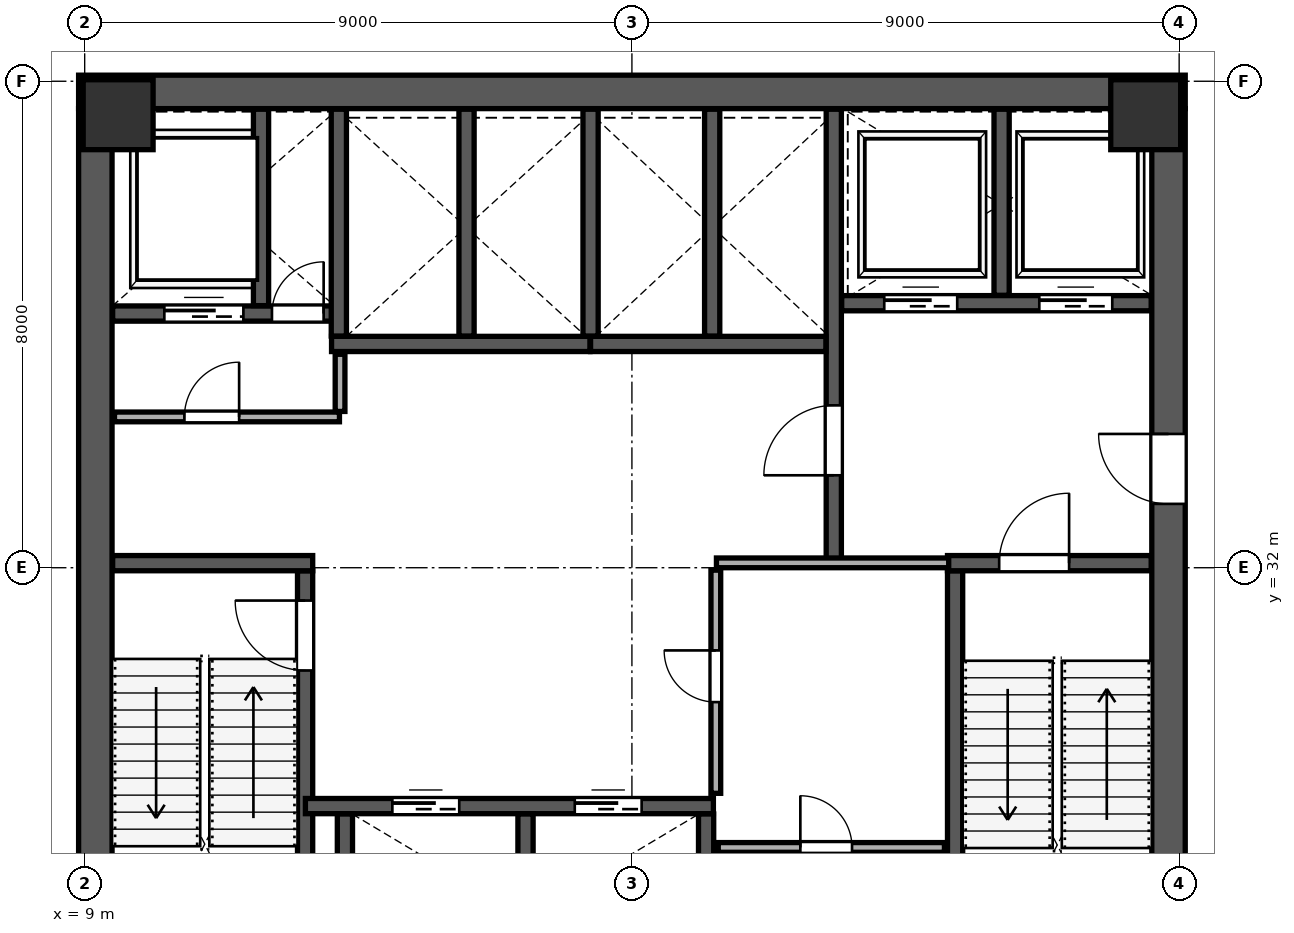
"""IFC4 building model, lengths in metres.
Left out: names, types, materials, properties, quantities, classifications, styles, units other than length and angle.
Written with IfcOpenShell. Run it as: python <this file> out.ifc"""

import sys

from ifc_helpers import new_model, si_unit, direction, frame, frame_2d, origin, origin_2d, place, context, subcontext, project, spatial, rectangle, extrude, source, transform, mapped, element, fill, save


model = new_model("IFC4")
c1 = context("Model", 3, precision=1e-05, world=origin(), true_north=direction((0.0, 1.0)))
c2 = subcontext(c1, "Body", "Model", "MODEL_VIEW")
j1 = project(units=[si_unit("LENGTHUNIT", "METRE"), si_unit("PLANEANGLEUNIT", "RADIAN")], contexts=[c1])
p1 = place(None, origin())
s1 = spatial("IfcSite", under=j1, at=p1, CompositionType="ELEMENT")
p2 = place(p1, origin())
s2 = spatial("IfcBuilding", under=s1, at=p2, CompositionType="ELEMENT")
p3 = place(p2, frame((0.0, 0.0, 95.8)))
s3 = spatial("IfcBuildingStorey", under=s2, at=p3, CompositionType="ELEMENT", Elevation=95.8)
m1 = source(origin(), c2, "Body", "SweptSolid", [
    extrude(rectangle(XDim=1.15, YDim=1.15, at=origin_2d()), origin(), (0.0, 0.0, 1.0), 4.198),
])
for number, where, z_axis, x_axis in (
    (1, (9.55, 39.45, 0.001), (0.0, 0.0, 1.0), (1.0, 0.0, 0.0)),
    (2, (26.45, 39.45, 0.001), (0.0, 0.0, 1.0), (1.0, 0.0, 0.0)),
):
    element("IfcColumn", number, at=place(p3, frame(where, z_axis=z_axis, x_axis=x_axis)), inside=s3, PredefinedType="COLUMN", context=c2, shape_type="MappedRepresentation", body=[
        mapped(m1, transform((0.0, 0.0, 0.0), scale=1.0)),
    ])
p4 = place(p3, frame((9.175, 24.45, 0.0), z_axis=(0.0, 0.0, 1.0), x_axis=(0.0, 1.0, 0.0)))
e3 = element("IfcWall", 3, at=p4, inside=s3, PredefinedType="SHEAR", context=c2, shape_type="SweptSolid", body=[
    extrude(rectangle(XDim=15.1, YDim=0.55, at=frame_2d((7.55, 0.0))), origin(), (0.0, 0.0, 1.0), 3.96),
])
p5 = place(p3, frame((26.825, 24.45, 0.0), z_axis=(0.0, 0.0, 1.0), x_axis=(0.0, 1.0, 0.0)))
e4 = element("IfcWall", 4, at=p5, inside=s3, PredefinedType="SHEAR", context=c2, shape_type="SweptSolid", body=[
    extrude(rectangle(XDim=15.1, YDim=0.55, at=frame_2d((7.55, 0.0))), origin(), (0.0, 0.0, 1.0), 3.96),
])
p6 = place(p5, frame((8.6, 0.0, 0.0)))
e5 = element("IfcOpeningElement", 5, at=p6, cuts=e4, PredefinedType="OPENING", context=c2, shape_type="SweptSolid", body=[
    extrude(rectangle(XDim=1.15, YDim=2.2, at=frame_2d((0.575, 1.1))), frame((0.0, 0.285, 0.0), z_axis=(0.0, -1.0, 0.0), x_axis=(1.0, 0.0, 0.0)), (0.0, 0.0, 1.0), 0.57),
])
p7 = place(p3, frame((8.9, 39.825, 0.0), z_axis=(0.0, 0.0, 1.0), x_axis=(1.0, 0.0, 0.0)))
e6 = element("IfcWall", 6, at=p7, inside=s3, PredefinedType="SHEAR", context=c2, shape_type="SweptSolid", body=[
    extrude(rectangle(XDim=18.2, YDim=0.55, at=frame_2d((9.1, 0.0))), origin(), (0.0, 0.0, 1.0), 3.96),
])
p8 = place(p3, frame((12.625, 24.46, 0.0), z_axis=(0.0, 0.0, 1.0), x_axis=(0.0, 1.0, 0.0)))
e7 = element("IfcWall", 7, at=p8, inside=s3, PredefinedType="SHEAR", context=c2, shape_type="SweptSolid", body=[
    extrude(rectangle(XDim=7.49, YDim=0.25, at=frame_2d((3.745, 0.0))), origin(), (0.0, 0.0, 1.0), 3.96),
])
p9 = place(p8, frame((5.85, 0.0, 0.0)))
e8 = element("IfcOpeningElement", 8, at=p9, cuts=e7, PredefinedType="OPENING", context=c2, shape_type="SweptSolid", body=[
    extrude(rectangle(XDim=1.15, YDim=2.2, at=frame_2d((0.575, 1.1))), frame((0.0, 0.135, 0.0), z_axis=(0.0, -1.0, 0.0), x_axis=(1.0, 0.0, 0.0)), (0.0, 0.0, 1.0), 0.27),
])
p10 = place(p3, frame((9.46, 32.075, 0.0), z_axis=(0.0, 0.0, 1.0), x_axis=(1.0, 0.0, 0.0)))
e9 = element("IfcWall", 9, at=p10, inside=s3, PredefinedType="SHEAR", context=c2, shape_type="SweptSolid", body=[
    extrude(rectangle(XDim=3.29, YDim=0.25, at=frame_2d((1.645, 0.0))), origin(), (0.0, 0.0, 1.0), 3.96),
])
p11 = place(p3, frame((23.315, 24.46, 0.0), z_axis=(0.0, 0.0, 1.0), x_axis=(0.0, 1.0, 0.0)))
e10 = element("IfcWall", 10, at=p11, inside=s3, PredefinedType="SHEAR", context=c2, shape_type="SweptSolid", body=[
    extrude(rectangle(XDim=7.49, YDim=0.25, at=frame_2d((3.745, 0.0))), origin(), (0.0, 0.0, 1.0), 3.96),
])
p12 = place(p3, frame((23.19, 32.075, 0.0), z_axis=(0.0, 0.0, 1.0), x_axis=(1.0, 0.0, 0.0)))
e11 = element("IfcWall", 11, at=p12, inside=s3, PredefinedType="SHEAR", context=c2, shape_type="SweptSolid", body=[
    extrude(rectangle(XDim=3.35, YDim=0.25, at=frame_2d((1.675, 0.0))), origin(), (0.0, 0.0, 1.0), 3.96),
])
p13 = place(p12, frame((0.85, 0.0, 0.0)))
e12 = element("IfcOpeningElement", 12, at=p13, cuts=e11, PredefinedType="OPENING", context=c2, shape_type="SweptSolid", body=[
    extrude(rectangle(XDim=1.15, YDim=2.2, at=frame_2d((0.575, 1.1))), frame((0.0, 0.135, 0.0), z_axis=(0.0, -1.0, 0.0), x_axis=(1.0, 0.0, 0.0)), (0.0, 0.0, 1.0), 0.27),
])
p14 = place(p3, frame((21.32, 32.12, 0.0), z_axis=(0.0, 0.0, 1.0), x_axis=(0.0, 1.0, 0.0)))
e13 = element("IfcWall", 13, at=p14, inside=s3, PredefinedType="SHEAR", context=c2, shape_type="SweptSolid", body=[
    extrude(rectangle(XDim=7.42, YDim=0.25, at=frame_2d((3.71, 0.0))), origin(), (0.0, 0.0, 1.0), 3.96),
])
p15 = place(p14, frame((1.4, 0.0, 0.0)))
e14 = element("IfcOpeningElement", 14, at=p15, cuts=e13, PredefinedType="OPENING", context=c2, shape_type="SweptSolid", body=[
    extrude(rectangle(XDim=1.15, YDim=2.2, at=frame_2d((0.575, 1.1))), frame((0.0, 0.135, 0.0), z_axis=(0.0, -1.0, 0.0), x_axis=(1.0, 0.0, 0.0)), (0.0, 0.0, 1.0), 0.27),
])
p16 = place(p3, frame((9.46, 36.18, 0.0), z_axis=(0.0, 0.0, 1.0), x_axis=(1.0, 0.0, 0.0)))
e15 = element("IfcWall", 15, at=p16, inside=s3, PredefinedType="SHEAR", context=c2, shape_type="SweptSolid", body=[
    extrude(rectangle(XDim=3.79, YDim=0.25, at=frame_2d((1.895, 0.0))), origin(), (0.0, 0.0, 1.0), 3.96),
])
p17 = place(p16, frame((2.62, 0.0, 0.0)))
e16 = element("IfcOpeningElement", 16, at=p17, cuts=e15, PredefinedType="OPENING", context=c2, shape_type="SweptSolid", body=[
    extrude(rectangle(XDim=0.85, YDim=2.1, at=frame_2d((0.425, 1.05))), frame((0.0, 0.135, 0.0), z_axis=(0.0, -1.0, 0.0), x_axis=(1.0, 0.0, 0.0)), (0.0, 0.0, 1.0), 0.27),
])
p18 = place(p16, frame((0.85, 0.0, 0.0)))
e17 = element("IfcOpeningElement", 17, at=p18, cuts=e15, PredefinedType="OPENING", context=c2, shape_type="SweptSolid", body=[
    extrude(rectangle(XDim=1.3, YDim=2.25, at=frame_2d((0.65, 1.125))), frame((0.0, 0.135, 0.0), z_axis=(0.0, -1.0, 0.0), x_axis=(1.0, 0.0, 0.0)), (0.0, 0.0, 1.0), 0.27),
])
p19 = place(p3, frame((11.9, 36.31, 0.0), z_axis=(0.0, 0.0, 1.0), x_axis=(0.0, 1.0, 0.0)))
e18 = element("IfcWall", 18, at=p19, inside=s3, PredefinedType="SHEAR", context=c2, shape_type="SweptSolid", body=[
    extrude(rectangle(XDim=3.23, YDim=0.25, at=frame_2d((1.615, 0.0))), origin(), (0.0, 0.0, 1.0), 3.96),
])
p20 = place(p3, frame((21.45, 36.35, 0.0), z_axis=(0.0, 0.0, 1.0), x_axis=(1.0, 0.0, 0.0)))
e19 = element("IfcWall", 19, at=p20, inside=s3, PredefinedType="SHEAR", context=c2, shape_type="SweptSolid", body=[
    extrude(rectangle(XDim=5.09, YDim=0.25, at=frame_2d((2.545, 0.0))), origin(), (0.0, 0.0, 1.0), 3.96),
])
p21 = place(p20, frame((0.7, 0.0, 0.0)))
e20 = element("IfcOpeningElement", 20, at=p21, cuts=e19, PredefinedType="OPENING", context=c2, shape_type="SweptSolid", body=[
    extrude(rectangle(XDim=1.2, YDim=2.2, at=frame_2d((0.6, 1.1))), frame((0.0, 0.135, 0.0), z_axis=(0.0, -1.0, 0.0), x_axis=(1.0, 0.0, 0.0)), (0.0, 0.0, 1.0), 0.27),
])
p22 = place(p20, frame((3.25, 0.0, 0.0)))
e21 = element("IfcOpeningElement", 21, at=p22, cuts=e19, PredefinedType="OPENING", context=c2, shape_type="SweptSolid", body=[
    extrude(rectangle(XDim=1.2, YDim=2.2, at=frame_2d((0.6, 1.1))), frame((0.0, 0.135, 0.0), z_axis=(0.0, -1.0, 0.0), x_axis=(1.0, 0.0, 0.0)), (0.0, 0.0, 1.0), 0.27),
])
p23 = place(p3, frame((24.08, 36.48, 0.0), z_axis=(0.0, 0.0, 1.0), x_axis=(0.0, 1.0, 0.0)))
e22 = element("IfcWall", 22, at=p23, inside=s3, PredefinedType="SHEAR", context=c2, shape_type="SweptSolid", body=[
    extrude(rectangle(XDim=3.06, YDim=0.25, at=frame_2d((1.53, 0.0))), origin(), (0.0, 0.0, 1.0), 3.96),
])
p24 = place(p3, frame((12.63, 28.08, 0.0), z_axis=(0.0, 0.0, 1.0), x_axis=(1.0, 0.0, 0.0)))
e23 = element("IfcWall", 23, at=p24, inside=s3, PredefinedType="SHEAR", context=c2, shape_type="SweptSolid", body=[
    extrude(rectangle(XDim=6.71, YDim=0.25, at=frame_2d((3.355, 0.0))), origin(), (0.0, 0.0, 1.0), 3.96),
])
p25 = place(p24, frame((1.43, 0.0, 0.0)))
e24 = element("IfcOpeningElement", 24, at=p25, cuts=e23, PredefinedType="OPENING", context=c2, shape_type="SweptSolid", body=[
    extrude(rectangle(XDim=1.1, YDim=2.2, at=frame_2d((0.55, 1.1))), frame((0.0, 0.135, 0.0), z_axis=(0.0, -1.0, 0.0), x_axis=(1.0, 0.0, 0.0)), (0.0, 0.0, 1.0), 0.27),
])
p26 = place(p24, frame((4.43, 0.0, 0.0)))
e25 = element("IfcOpeningElement", 25, at=p26, cuts=e23, PredefinedType="OPENING", context=c2, shape_type="SweptSolid", body=[
    extrude(rectangle(XDim=1.1, YDim=2.2, at=frame_2d((0.55, 1.1))), frame((0.0, 0.135, 0.0), z_axis=(0.0, -1.0, 0.0), x_axis=(1.0, 0.0, 0.0)), (0.0, 0.0, 1.0), 0.27),
])
for number, where, z_axis, x_axis in (
    (26, (13.28, 24.46, 0.0), (0.0, 0.0, 1.0), (0.0, 1.0, 0.0)),
    (27, (16.25, 24.46, 0.0), (0.0, 0.0, 1.0), (0.0, 1.0, 0.0)),
    (28, (19.22, 24.46, 0.0), (0.0, 0.0, 1.0), (0.0, 1.0, 0.0)),
):
    element("IfcWall", number, at=place(p3, frame(where, z_axis=z_axis, x_axis=x_axis)), inside=s3, PredefinedType="SHEAR", context=c2, shape_type="SweptSolid", body=[
        extrude(rectangle(XDim=3.49, YDim=0.25, at=frame_2d((1.745, 0.0))), origin(), (0.0, 0.0, 1.0), 3.96),
    ])
p27 = place(p3, frame((13.06, 35.68, 0.0), z_axis=(0.0, 0.0, 1.0), x_axis=(1.0, 0.0, 0.0)))
e29 = element("IfcWall", 29, at=p27, inside=s3, PredefinedType="SHEAR", context=c2, shape_type="SweptSolid", body=[
    extrude(rectangle(XDim=4.25, YDim=0.25, at=frame_2d((2.125, 0.0))), origin(), (0.0, 0.0, 1.0), 3.96),
])
for number, where, z_axis, x_axis in (
    (30, (13.18, 35.81, 0.0), (0.0, 0.0, 1.0), (0.0, 1.0, 0.0)),
    (31, (15.28, 35.81, 0.0), (0.0, 0.0, 1.0), (0.0, 1.0, 0.0)),
):
    element("IfcWall", number, at=place(p3, frame(where, z_axis=z_axis, x_axis=x_axis)), inside=s3, PredefinedType="SHEAR", context=c2, shape_type="SweptSolid", body=[
        extrude(rectangle(XDim=3.73, YDim=0.25, at=frame_2d((1.865, 0.0))), origin(), (0.0, 0.0, 1.0), 3.96),
    ])
p28 = place(p3, frame((17.32, 35.68, 0.0), z_axis=(0.0, 0.0, 1.0), x_axis=(1.0, 0.0, 0.0)))
e32 = element("IfcWall", 32, at=p28, inside=s3, PredefinedType="SHEAR", context=c2, shape_type="SweptSolid", body=[
    extrude(rectangle(XDim=3.87, YDim=0.25, at=frame_2d((1.935, 0.0))), origin(), (0.0, 0.0, 1.0), 3.96),
])
for number, where, z_axis, x_axis in (
    (33, (17.32, 35.81, 0.0), (0.0, 0.0, 1.0), (0.0, 1.0, 0.0)),
    (34, (19.32, 35.81, 0.0), (0.0, 0.0, 1.0), (0.0, 1.0, 0.0)),
):
    element("IfcWall", number, at=place(p3, frame(where, z_axis=z_axis, x_axis=x_axis)), inside=s3, PredefinedType="SHEAR", context=c2, shape_type="SweptSolid", body=[
        extrude(rectangle(XDim=3.73, YDim=0.25, at=frame_2d((1.865, 0.0))), origin(), (0.0, 0.0, 1.0), 3.96),
    ])
p29 = place(p3, frame((9.49, 34.48, 0.0), z_axis=(0.0, 0.0, 1.0), x_axis=(1.0, 0.0, 0.0)))
e35 = element("IfcWall", 35, at=p29, inside=s3, PredefinedType="PARTITIONING", context=c2, shape_type="SweptSolid", body=[
    extrude(rectangle(XDim=3.7, YDim=0.16, at=frame_2d((1.85, 0.0))), origin(), (0.0, 0.0, 1.0), 3.96),
])
p30 = place(p29, frame((1.15, 0.0, 0.0)))
e36 = element("IfcOpeningElement", 36, at=p30, cuts=e35, PredefinedType="OPENING", context=c2, shape_type="SweptSolid", body=[
    extrude(rectangle(XDim=0.9, YDim=2.15, at=frame_2d((0.45, 1.075))), frame((0.0, 0.09, 0.0), z_axis=(0.0, -1.0, 0.0), x_axis=(1.0, 0.0, 0.0)), (0.0, 0.0, 1.0), 0.18),
])
p31 = place(p3, frame((13.2, 34.57, 0.0), z_axis=(0.0, 0.0, 1.0), x_axis=(0.0, 1.0, 0.0)))
e37 = element("IfcWall", 37, at=p31, inside=s3, PredefinedType="PARTITIONING", context=c2, shape_type="SweptSolid", body=[
    extrude(rectangle(XDim=0.94, YDim=0.16, at=frame_2d((0.47, 0.0))), origin(), (0.0, 0.0, 1.0), 3.96),
])
p32 = place(p3, frame((19.39, 32.08, 0.0), z_axis=(0.0, 0.0, 1.0), x_axis=(1.0, 0.0, 0.0)))
e38 = element("IfcWall", 38, at=p32, inside=s3, PredefinedType="PARTITIONING", context=c2, shape_type="SweptSolid", body=[
    extrude(rectangle(XDim=3.82, YDim=0.16, at=frame_2d((1.91, 0.0))), origin(), (0.0, 0.0, 1.0), 3.96),
])
p33 = place(p3, frame((19.38, 28.29, 0.0), z_axis=(0.0, 0.0, 1.0), x_axis=(0.0, 1.0, 0.0)))
e39 = element("IfcWall", 39, at=p33, inside=s3, PredefinedType="PARTITIONING", context=c2, shape_type="SweptSolid", body=[
    extrude(rectangle(XDim=3.67, YDim=0.16, at=frame_2d((1.835, 0.0))), origin(), (0.0, 0.0, 1.0), 3.96),
])
p34 = place(p33, frame((1.5, 0.0, 0.0)))
e40 = element("IfcOpeningElement", 40, at=p34, cuts=e39, PredefinedType="OPENING", context=c2, shape_type="SweptSolid", body=[
    extrude(rectangle(XDim=0.85, YDim=2.1, at=frame_2d((0.425, 1.05))), frame((0.0, 0.09, 0.0), z_axis=(0.0, -1.0, 0.0), x_axis=(1.0, 0.0, 0.0)), (0.0, 0.0, 1.0), 0.18),
])
p35 = place(p3, frame((19.42, 27.4, 0.0), z_axis=(0.0, 0.0, 1.0), x_axis=(1.0, 0.0, 0.0)))
e41 = element("IfcWall", 41, at=p35, inside=s3, PredefinedType="PARTITIONING", context=c2, shape_type="SweptSolid", body=[
    extrude(rectangle(XDim=3.72, YDim=0.16, at=frame_2d((1.86, 0.0))), origin(), (0.0, 0.0, 1.0), 3.96),
])
p36 = place(p35, frame((1.35, 0.0, 0.0)))
e42 = element("IfcOpeningElement", 42, at=p36, cuts=e41, PredefinedType="OPENING", context=c2, shape_type="SweptSolid", body=[
    extrude(rectangle(XDim=0.85, YDim=2.1, at=frame_2d((0.425, 1.05))), frame((0.0, 0.09, 0.0), z_axis=(0.0, -1.0, 0.0), x_axis=(1.0, 0.0, 0.0)), (0.0, 0.0, 1.0), 0.18),
])
p37 = place(p3, frame((26.504, 12.433, 0.0), z_axis=(0.0, 0.0, 1.0), x_axis=(0.216434476574, 0.976297146032, 0.0)))
e43 = element("IfcWall", 43, at=p37, inside=s3, PredefinedType="PARTITIONING", context=c2, shape_type="SweptSolid", body=[
    extrude(rectangle(XDim=20.38, YDim=0.16, at=frame_2d((10.19, 0.0))), origin(), (0.0, 0.0, 1.0), 3.96),
])
m2 = source(origin(), c2, "Body", "SweptSolid", [
    extrude(rectangle(XDim=1.15, YDim=2.2, at=frame_2d((0.575, 1.1))), frame((0.0, 0.025, 0.0), z_axis=(0.0, -1.0, 0.0), x_axis=(1.0, 0.0, 0.0)), (0.0, 0.0, 1.0), 0.05),
])
p38 = place(p9, origin())
e44 = element("IfcDoor", 44, at=p38, inside=s3, OperationType="SINGLE_SWING_RIGHT", PredefinedType="DOOR", context=c2, shape_type="MappedRepresentation", body=[
    mapped(m2, transform((0.0, 0.0, 0.0), scale=1.0)),
])
fill(e8, e44)
m3 = source(origin(), c2, "Body", "SweptSolid", [
    extrude(rectangle(XDim=1.15, YDim=2.2, at=frame_2d((0.575, 1.1))), frame((0.0, 0.025, 0.0), z_axis=(0.0, -1.0, 0.0), x_axis=(1.0, 0.0, 0.0)), (0.0, 0.0, 1.0), 0.05),
])
p39 = place(p15, origin())
e45 = element("IfcDoor", 45, at=p39, inside=s3, OperationType="SINGLE_SWING_LEFT", PredefinedType="DOOR", context=c2, shape_type="MappedRepresentation", body=[
    mapped(m3, transform((0.0, 0.0, 0.0), scale=1.0)),
])
fill(e14, e45)
p40 = place(p13, origin())
e46 = element("IfcDoor", 46, at=p40, inside=s3, OperationType="SINGLE_SWING_RIGHT", PredefinedType="DOOR", context=c2, shape_type="MappedRepresentation", body=[
    mapped(m2, transform((0.0, 0.0, 0.0), scale=1.0)),
])
fill(e12, e46)
p41 = place(p6, origin())
e47 = element("IfcDoor", 47, at=p41, inside=s3, OperationType="SINGLE_SWING_RIGHT", PredefinedType="DOOR", context=c2, shape_type="MappedRepresentation", body=[
    mapped(m3, transform((0.0, 0.0, 0.0), scale=1.0)),
])
fill(e5, e47)
m4 = source(origin(), c2, "Body", "SweptSolid", [
    extrude(rectangle(XDim=0.85, YDim=2.1, at=frame_2d((0.425, 1.05))), frame((0.0, 0.025, 0.0), z_axis=(0.0, -1.0, 0.0), x_axis=(1.0, 0.0, 0.0)), (0.0, 0.0, 1.0), 0.05),
])
p42 = place(p17, origin())
e48 = element("IfcDoor", 48, at=p42, inside=s3, OperationType="SINGLE_SWING_RIGHT", PredefinedType="DOOR", context=c2, shape_type="MappedRepresentation", body=[
    mapped(m4, transform((0.0, 0.0, 0.0), scale=1.0)),
])
fill(e16, e48)
m5 = source(origin(), c2, "Body", "SweptSolid", [
    extrude(rectangle(XDim=1.1, YDim=2.2, at=frame_2d((0.55, 1.1))), frame((0.0, 0.025, 0.0), z_axis=(0.0, -1.0, 0.0), x_axis=(1.0, 0.0, 0.0)), (0.0, 0.0, 1.0), 0.05),
])
p43 = place(p25, origin())
e49 = element("IfcDoor", 49, at=p43, inside=s3, OperationType="SLIDING_TO_LEFT", PredefinedType="DOOR", context=c2, shape_type="MappedRepresentation", body=[
    mapped(m5, transform((0.0, 0.0, 0.0), scale=1.0)),
])
fill(e24, e49)
p44 = place(p26, origin())
e50 = element("IfcDoor", 50, at=p44, inside=s3, OperationType="SLIDING_TO_RIGHT", PredefinedType="DOOR", context=c2, shape_type="MappedRepresentation", body=[
    mapped(m5, transform((0.0, 0.0, 0.0), scale=1.0)),
])
fill(e25, e50)
m6 = source(origin(), c2, "Body", "SweptSolid", [
    extrude(rectangle(XDim=1.2, YDim=2.2, at=frame_2d((0.6, 1.1))), frame((0.0, 0.025, 0.0), z_axis=(0.0, -1.0, 0.0), x_axis=(1.0, 0.0, 0.0)), (0.0, 0.0, 1.0), 0.05),
])
p45 = place(p21, origin())
e51 = element("IfcDoor", 51, at=p45, inside=s3, OperationType="SLIDING_TO_LEFT", PredefinedType="DOOR", context=c2, shape_type="MappedRepresentation", body=[
    mapped(m6, transform((0.0, 0.0, 0.0), scale=1.0)),
])
fill(e20, e51)
p46 = place(p22, origin())
e52 = element("IfcDoor", 52, at=p46, inside=s3, OperationType="SLIDING_TO_RIGHT", PredefinedType="DOOR", context=c2, shape_type="MappedRepresentation", body=[
    mapped(m6, transform((0.0, 0.0, 0.0), scale=1.0)),
])
fill(e21, e52)
m7 = source(origin(), c2, "Body", "SweptSolid", [
    extrude(rectangle(XDim=1.3, YDim=2.25, at=frame_2d((0.65, 1.125))), frame((0.0, 0.025, 0.0), z_axis=(0.0, -1.0, 0.0), x_axis=(1.0, 0.0, 0.0)), (0.0, 0.0, 1.0), 0.05),
])
p47 = place(p18, origin())
e53 = element("IfcDoor", 53, at=p47, inside=s3, OperationType="SLIDING_TO_LEFT", PredefinedType="DOOR", context=c2, shape_type="MappedRepresentation", body=[
    mapped(m7, transform((0.0, 0.0, 0.0), scale=1.0)),
])
fill(e17, e53)
m8 = source(origin(), c2, "Body", "SweptSolid", [
    extrude(rectangle(XDim=0.9, YDim=2.15, at=frame_2d((0.45, 1.075))), frame((0.0, 0.025, 0.0), z_axis=(0.0, -1.0, 0.0), x_axis=(1.0, 0.0, 0.0)), (0.0, 0.0, 1.0), 0.05),
])
p48 = place(p30, origin())
e54 = element("IfcDoor", 54, at=p48, inside=s3, OperationType="SINGLE_SWING_RIGHT", PredefinedType="DOOR", context=c2, shape_type="MappedRepresentation", body=[
    mapped(m8, transform((0.0, 0.0, 0.0), scale=1.0)),
])
fill(e36, e54)
p49 = place(p36, origin())
e55 = element("IfcDoor", 55, at=p49, inside=s3, OperationType="SINGLE_SWING_LEFT", PredefinedType="DOOR", context=c2, shape_type="MappedRepresentation", body=[
    mapped(m4, transform((0.0, 0.0, 0.0), scale=1.0)),
])
fill(e42, e55)
p50 = place(p34, origin())
e56 = element("IfcDoor", 56, at=p50, inside=s3, OperationType="SINGLE_SWING_RIGHT", PredefinedType="DOOR", context=c2, shape_type="MappedRepresentation", body=[
    mapped(m4, transform((0.0, 0.0, 0.0), scale=1.0)),
])
fill(e40, e56)
save(model, sys.argv[1])
